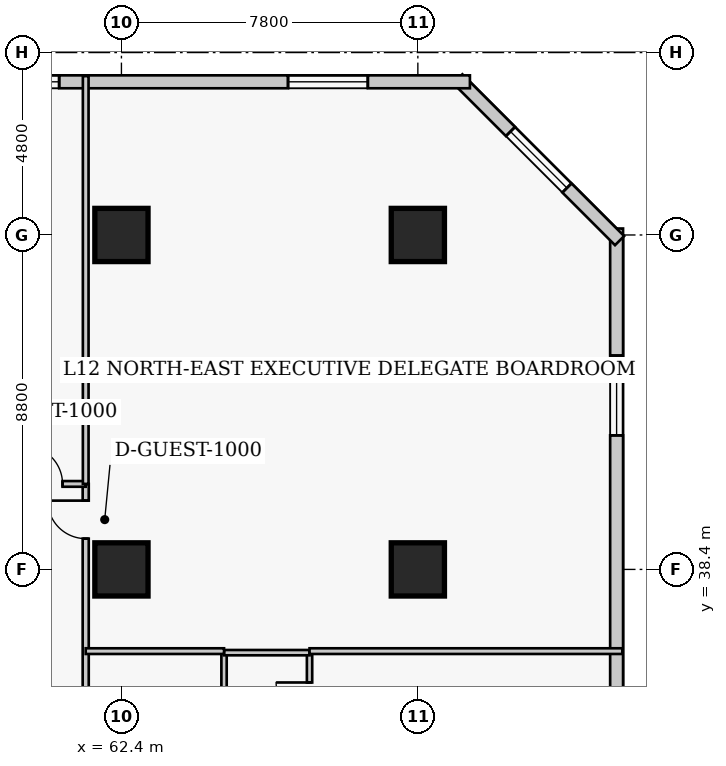
"""IFC4 building model, lengths in metres.
Left out: names, types, materials, properties, quantities, classifications, styles, units other than length and angle.
Written with IfcOpenShell. Run it as: python <this file> out.ifc"""

import sys

from ifc_helpers import new_model, si_unit, direction, frame, frame_2d, origin, origin_2d, place, context, subcontext, project, spatial, rectangle, extrude, element, fill, save


model = new_model("IFC4")
c1 = context("Model", 3, precision=1e-05, world=origin(), true_north=direction((0.0, 1.0)))
c2 = subcontext(c1, "Body", "Model", "MODEL_VIEW")
j1 = project(units=[si_unit("LENGTHUNIT", "METRE"), si_unit("PLANEANGLEUNIT", "RADIAN")], contexts=[c1])
p1 = place(None, origin())
s1 = spatial("IfcSite", under=j1, at=p1, CompositionType="ELEMENT")
p2 = place(p1, origin())
s2 = spatial("IfcBuilding", under=s1, at=p2, CompositionType="ELEMENT")
p3 = place(p2, frame((0.0, 0.0, 52.6)))
s3 = spatial("IfcBuildingStorey", under=s2, at=p3, CompositionType="ELEMENT", Elevation=52.6)
for number, where, z_axis, x_axis in (
    (1, (62.4, 38.4, 0.0), (0.0, 0.0, 1.0), (1.0, 0.0, 0.0)),
    (2, (62.4, 47.2, 0.0), (0.0, 0.0, 1.0), (1.0, 0.0, 0.0)),
    (3, (70.2, 38.4, 0.0), (0.0, 0.0, 1.0), (1.0, 0.0, 0.0)),
    (4, (70.2, 47.2, 0.0), (0.0, 0.0, 1.0), (1.0, 0.0, 0.0)),
):
    element("IfcColumn", number, at=place(p3, frame(where, z_axis=z_axis, x_axis=x_axis)), inside=s3, PredefinedType="COLUMN", context=c2, shape_type="SweptSolid", body=[
        extrude(rectangle(XDim=1.4, YDim=1.4, at=origin_2d()), origin(), (0.0, 0.0, 1.0), 3.8),
    ])
p4 = place(p3, frame((75.43, 12.23, 0.0), z_axis=(0.0, 0.0, 1.0), x_axis=(0.0, 1.0, 0.0)))
e5 = element("IfcWall", 5, at=p4, inside=s3, PredefinedType="SOLIDWALL", context=c2, shape_type="SweptSolid", body=[
    extrude(rectangle(XDim=35.14, YDim=0.34, at=frame_2d((17.57, 0.0))), origin(), (0.0, 0.0, 1.0), 3.54),
])
p5 = place(p4, frame((3.343, 0.0, 0.85)))
e6 = element("IfcOpeningElement", 6, at=p5, cuts=e5, PredefinedType="OPENING", context=c2, shape_type="SweptSolid", body=[
    extrude(rectangle(XDim=2.1, YDim=1.85, at=frame_2d((1.05, 0.925))), frame((0.0, 0.18, 0.0), z_axis=(0.0, -1.0, 0.0), x_axis=(1.0, 0.0, 0.0)), (0.0, 0.0, 1.0), 0.36),
])
p6 = place(p4, frame((12.127, 0.0, 0.85)))
e7 = element("IfcOpeningElement", 7, at=p6, cuts=e5, PredefinedType="OPENING", context=c2, shape_type="SweptSolid", body=[
    extrude(rectangle(XDim=2.1, YDim=1.85, at=frame_2d((1.05, 0.925))), frame((0.0, 0.18, 0.0), z_axis=(0.0, -1.0, 0.0), x_axis=(1.0, 0.0, 0.0)), (0.0, 0.0, 1.0), 0.36),
])
p7 = place(p4, frame((20.913, 0.0, 0.85)))
e8 = element("IfcOpeningElement", 8, at=p7, cuts=e5, PredefinedType="OPENING", context=c2, shape_type="SweptSolid", body=[
    extrude(rectangle(XDim=2.1, YDim=1.85, at=frame_2d((1.05, 0.925))), frame((0.0, 0.18, 0.0), z_axis=(0.0, -1.0, 0.0), x_axis=(1.0, 0.0, 0.0)), (0.0, 0.0, 1.0), 0.36),
])
p8 = place(p4, frame((29.698, 0.0, 0.85)))
e9 = element("IfcOpeningElement", 9, at=p8, cuts=e5, PredefinedType="OPENING", context=c2, shape_type="SweptSolid", body=[
    extrude(rectangle(XDim=2.1, YDim=1.85, at=frame_2d((1.05, 0.925))), frame((0.0, 0.18, 0.0), z_axis=(0.0, -1.0, 0.0), x_axis=(1.0, 0.0, 0.0)), (0.0, 0.0, 1.0), 0.36),
])
p9 = place(p3, frame((75.508, 47.052, 0.0), z_axis=(0.0, 0.0, 1.0), x_axis=(-0.707106781187, 0.707106781187, 0.0)))
e10 = element("IfcWall", 10, at=p9, inside=s3, PredefinedType="SOLIDWALL", context=c2, shape_type="SweptSolid", body=[
    extrude(rectangle(XDim=6.02, YDim=0.34, at=frame_2d((3.01, 0.0))), origin(), (0.0, 0.0, 1.0), 3.54),
])
p10 = place(p9, frame((1.96, 0.0, 0.85)))
e11 = element("IfcOpeningElement", 11, at=p10, cuts=e10, PredefinedType="OPENING", context=c2, shape_type="SweptSolid", body=[
    extrude(rectangle(XDim=2.1, YDim=1.85, at=frame_2d((1.05, 0.925))), frame((0.0, 0.18, 0.0), z_axis=(0.0, -1.0, 0.0), x_axis=(1.0, 0.0, 0.0)), (0.0, 0.0, 1.0), 0.36),
])
p11 = place(p3, frame((71.57, 51.23, 0.0), z_axis=(0.0, 0.0, 1.0), x_axis=(-1.0, 0.0, 0.0)))
e12 = element("IfcWall", 12, at=p11, inside=s3, PredefinedType="SOLIDWALL", context=c2, shape_type="SweptSolid", body=[
    extrude(rectangle(XDim=29.89, YDim=0.34, at=frame_2d((14.945, 0.0))), origin(), (0.0, 0.0, 1.0), 3.54),
])
p12 = place(p11, frame((2.686, 0.0, 0.85)))
e13 = element("IfcOpeningElement", 13, at=p12, cuts=e12, PredefinedType="OPENING", context=c2, shape_type="SweptSolid", body=[
    extrude(rectangle(XDim=2.1, YDim=1.85, at=frame_2d((1.05, 0.925))), frame((0.0, 0.18, 0.0), z_axis=(0.0, -1.0, 0.0), x_axis=(1.0, 0.0, 0.0)), (0.0, 0.0, 1.0), 0.36),
])
p13 = place(p11, frame((10.809, 0.0, 0.85)))
e14 = element("IfcOpeningElement", 14, at=p13, cuts=e12, PredefinedType="OPENING", context=c2, shape_type="SweptSolid", body=[
    extrude(rectangle(XDim=2.1, YDim=1.85, at=frame_2d((1.05, 0.925))), frame((0.0, 0.18, 0.0), z_axis=(0.0, -1.0, 0.0), x_axis=(1.0, 0.0, 0.0)), (0.0, 0.0, 1.0), 0.36),
])
p14 = place(p11, frame((17.631, 0.0, 0.85)))
e15 = element("IfcOpeningElement", 15, at=p14, cuts=e12, PredefinedType="OPENING", context=c2, shape_type="SweptSolid", body=[
    extrude(rectangle(XDim=2.1, YDim=1.85, at=frame_2d((1.05, 0.925))), frame((0.0, 0.18, 0.0), z_axis=(0.0, -1.0, 0.0), x_axis=(1.0, 0.0, 0.0)), (0.0, 0.0, 1.0), 0.36),
])
p15 = place(p11, frame((25.104, 0.0, 0.85)))
e16 = element("IfcOpeningElement", 16, at=p15, cuts=e12, PredefinedType="OPENING", context=c2, shape_type="SweptSolid", body=[
    extrude(rectangle(XDim=2.1, YDim=1.85, at=frame_2d((1.05, 0.925))), frame((0.0, 0.18, 0.0), z_axis=(0.0, -1.0, 0.0), x_axis=(1.0, 0.0, 0.0)), (0.0, 0.0, 1.0), 0.36),
])
p16 = place(p3, frame((61.46, 10.25, 0.0), z_axis=(0.0, 0.0, 1.0), x_axis=(0.0, 1.0, 0.0)))
e17 = element("IfcWall", 17, at=p16, inside=s3, PredefinedType="PARTITIONING", context=c2, shape_type="SweptSolid", body=[
    extrude(rectangle(XDim=30.4, YDim=0.16, at=frame_2d((15.2, 0.0))), origin(), (0.0, 0.0, 1.0), 3.54),
])
p17 = place(p16, frame((4.4, 0.0, 0.0)))
e18 = element("IfcOpeningElement", 18, at=p17, cuts=e17, PredefinedType="OPENING", context=c2, shape_type="SweptSolid", body=[
    extrude(rectangle(XDim=0.95, YDim=2.1, at=frame_2d((0.475, 1.05))), frame((0.0, 0.09, 0.0), z_axis=(0.0, -1.0, 0.0), x_axis=(1.0, 0.0, 0.0)), (0.0, 0.0, 1.0), 0.18),
])
p18 = place(p16, frame((13.337, 0.0, 0.0)))
e19 = element("IfcOpeningElement", 19, at=p18, cuts=e17, PredefinedType="OPENING", context=c2, shape_type="SweptSolid", body=[
    extrude(rectangle(XDim=0.95, YDim=2.1, at=frame_2d((0.475, 1.05))), frame((0.0, 0.09, 0.0), z_axis=(0.0, -1.0, 0.0), x_axis=(1.0, 0.0, 0.0)), (0.0, 0.0, 1.0), 0.18),
])
p19 = place(p16, frame((21.462, 0.0, 0.0)))
e20 = element("IfcOpeningElement", 20, at=p19, cuts=e17, PredefinedType="OPENING", context=c2, shape_type="SweptSolid", body=[
    extrude(rectangle(XDim=0.95, YDim=2.1, at=frame_2d((0.475, 1.05))), frame((0.0, 0.09, 0.0), z_axis=(0.0, -1.0, 0.0), x_axis=(1.0, 0.0, 0.0)), (0.0, 0.0, 1.0), 0.18),
])
p20 = place(p16, frame((28.96, 0.0, 0.0)))
e21 = element("IfcOpeningElement", 21, at=p20, cuts=e17, PredefinedType="OPENING", context=c2, shape_type="SweptSolid", body=[
    extrude(rectangle(XDim=1.0, YDim=2.15, at=frame_2d((0.5, 1.075))), frame((0.0, 0.09, 0.0), z_axis=(0.0, -1.0, 0.0), x_axis=(1.0, 0.0, 0.0)), (0.0, 0.0, 1.0), 0.18),
])
p21 = place(p3, frame((56.8, 40.65, 0.0), z_axis=(0.0, 0.0, 1.0), x_axis=(1.0, 0.0, 0.0)))
e22 = element("IfcWall", 22, at=p21, inside=s3, PredefinedType="PARTITIONING", context=c2, shape_type="SweptSolid", body=[
    extrude(rectangle(XDim=4.66, YDim=0.15, at=frame_2d((2.33, 0.0))), origin(), (0.0, 0.0, 1.0), 3.54),
])
p22 = place(p21, frame((3.05, 0.0, 0.0)))
e23 = element("IfcOpeningElement", 23, at=p22, cuts=e22, PredefinedType="OPENING", context=c2, shape_type="SweptSolid", body=[
    extrude(rectangle(XDim=1.0, YDim=2.15, at=frame_2d((0.5, 1.075))), frame((0.0, 0.085, 0.0), z_axis=(0.0, -1.0, 0.0), x_axis=(1.0, 0.0, 0.0)), (0.0, 0.0, 1.0), 0.17),
])
p23 = place(p3, frame((61.46, 40.65, 0.0), z_axis=(0.0, 0.0, 1.0), x_axis=(0.0, 1.0, 0.0)))
e24 = element("IfcWall", 24, at=p23, inside=s3, PredefinedType="PARTITIONING", context=c2, shape_type="SweptSolid", body=[
    extrude(rectangle(XDim=10.73, YDim=0.15, at=frame_2d((5.365, 0.0))), origin(), (0.0, 0.0, 1.0), 3.54),
])
p24 = place(p3, frame((65.1, 33.76, 0.0), z_axis=(0.0, 0.0, 1.0), x_axis=(0.0, 1.0, 0.0)))
e25 = element("IfcWall", 25, at=p24, inside=s3, PredefinedType="PLUMBINGWALL", context=c2, shape_type="SweptSolid", body=[
    extrude(rectangle(XDim=2.45, YDim=0.14, at=frame_2d((1.225, 0.0))), origin(), (0.0, 0.0, 1.0), 3.54),
])
p25 = place(p3, frame((67.35, 33.76, 0.0), z_axis=(0.0, 0.0, 1.0), x_axis=(0.0, 1.0, 0.0)))
e26 = element("IfcWall", 26, at=p25, inside=s3, PredefinedType="PLUMBINGWALL", context=c2, shape_type="SweptSolid", body=[
    extrude(rectangle(XDim=2.45, YDim=0.14, at=frame_2d((1.225, 0.0))), origin(), (0.0, 0.0, 1.0), 3.54),
])
p26 = place(p25, frame((0.785, 0.0, 0.0)))
e27 = element("IfcOpeningElement", 27, at=p26, cuts=e26, PredefinedType="OPENING", context=c2, shape_type="SweptSolid", body=[
    extrude(rectangle(XDim=0.88, YDim=2.05, at=frame_2d((0.44, 1.025))), frame((0.0, 0.08, 0.0), z_axis=(0.0, -1.0, 0.0), x_axis=(1.0, 0.0, 0.0)), (0.0, 0.0, 1.0), 0.16),
])
p27 = place(p3, frame((65.1, 36.21, 0.0), z_axis=(0.0, 0.0, 1.0), x_axis=(1.0, 0.0, 0.0)))
e28 = element("IfcWall", 28, at=p27, inside=s3, PredefinedType="PLUMBINGWALL", context=c2, shape_type="SweptSolid", body=[
    extrude(rectangle(XDim=2.25, YDim=0.14, at=frame_2d((1.125, 0.0))), origin(), (0.0, 0.0, 1.0), 3.54),
])
p28 = place(p3, frame((61.46, 36.25, 0.0), z_axis=(0.0, 0.0, 1.0), x_axis=(1.0, 0.0, 0.0)))
e29 = element("IfcWall", 29, at=p28, inside=s3, PredefinedType="PARTITIONING", context=c2, shape_type="SweptSolid", body=[
    extrude(rectangle(XDim=3.64, YDim=0.15, at=frame_2d((1.82, 0.0))), origin(), (0.0, 0.0, 1.0), 3.54),
])
p29 = place(p3, frame((67.35, 36.25, 0.0), z_axis=(0.0, 0.0, 1.0), x_axis=(1.0, 0.0, 0.0)))
e30 = element("IfcWall", 30, at=p29, inside=s3, PredefinedType="PARTITIONING", context=c2, shape_type="SweptSolid", body=[
    extrude(rectangle(XDim=8.23, YDim=0.15, at=frame_2d((4.115, 0.0))), origin(), (0.0, 0.0, 1.0), 3.54),
])
p30 = place(p8, origin())
e31 = element("IfcWindow", 31, at=p30, inside=s3, PartitioningType="SINGLE_PANEL", PredefinedType="WINDOW", context=c2, shape_type="SweptSolid", body=[
    extrude(rectangle(XDim=2.1, YDim=1.85, at=frame_2d((1.05, 0.925))), frame((0.0, 0.03, 0.0), z_axis=(0.0, -1.0, 0.0), x_axis=(1.0, 0.0, 0.0)), (0.0, 0.0, 1.0), 0.06),
])
fill(e9, e31)
p31 = place(p10, origin())
e32 = element("IfcWindow", 32, at=p31, inside=s3, PartitioningType="SINGLE_PANEL", PredefinedType="WINDOW", context=c2, shape_type="SweptSolid", body=[
    extrude(rectangle(XDim=2.1, YDim=1.85, at=frame_2d((1.05, 0.925))), frame((0.0, 0.03, 0.0), z_axis=(0.0, -1.0, 0.0), x_axis=(1.0, 0.0, 0.0)), (0.0, 0.0, 1.0), 0.06),
])
fill(e11, e32)
p32 = place(p12, origin())
e33 = element("IfcWindow", 33, at=p32, inside=s3, PartitioningType="SINGLE_PANEL", PredefinedType="WINDOW", context=c2, shape_type="SweptSolid", body=[
    extrude(rectangle(XDim=2.1, YDim=1.85, at=frame_2d((1.05, 0.925))), frame((0.0, 0.03, 0.0), z_axis=(0.0, -1.0, 0.0), x_axis=(1.0, 0.0, 0.0)), (0.0, 0.0, 1.0), 0.06),
])
fill(e13, e33)
p33 = place(p13, origin())
e34 = element("IfcWindow", 34, at=p33, inside=s3, PartitioningType="SINGLE_PANEL", PredefinedType="WINDOW", context=c2, shape_type="SweptSolid", body=[
    extrude(rectangle(XDim=2.1, YDim=1.85, at=frame_2d((1.05, 0.925))), frame((0.0, 0.03, 0.0), z_axis=(0.0, -1.0, 0.0), x_axis=(1.0, 0.0, 0.0)), (0.0, 0.0, 1.0), 0.06),
])
fill(e14, e34)
p34 = place(p22, origin())
e35 = element("IfcDoor", 35, at=p34, inside=s3, OperationType="SINGLE_SWING_LEFT", PredefinedType="DOOR", context=c2, shape_type="SweptSolid", body=[
    extrude(rectangle(XDim=1.0, YDim=2.15, at=frame_2d((0.5, 1.075))), frame((0.0, 0.025, 0.0), z_axis=(0.0, -1.0, 0.0), x_axis=(1.0, 0.0, 0.0)), (0.0, 0.0, 1.0), 0.05),
])
fill(e23, e35)
p35 = place(p26, origin())
e36 = element("IfcDoor", 36, at=p35, inside=s3, OperationType="SINGLE_SWING_RIGHT", PredefinedType="DOOR", context=c2, shape_type="SweptSolid", body=[
    extrude(rectangle(XDim=0.88, YDim=2.05, at=frame_2d((0.44, 1.025))), frame((0.0, 0.025, 0.0), z_axis=(0.0, -1.0, 0.0), x_axis=(1.0, 0.0, 0.0)), (0.0, 0.0, 1.0), 0.05),
])
fill(e27, e36)
p36 = place(p20, origin())
e37 = element("IfcDoor", 37, at=p36, inside=s3, OperationType="SINGLE_SWING_RIGHT", PredefinedType="DOOR", context=c2, shape_type="SweptSolid", body=[
    extrude(rectangle(XDim=1.0, YDim=2.15, at=frame_2d((0.5, 1.075))), frame((0.0, 0.025, 0.0), z_axis=(0.0, -1.0, 0.0), x_axis=(1.0, 0.0, 0.0)), (0.0, 0.0, 1.0), 0.05),
])
fill(e21, e37)
save(model, sys.argv[1])
